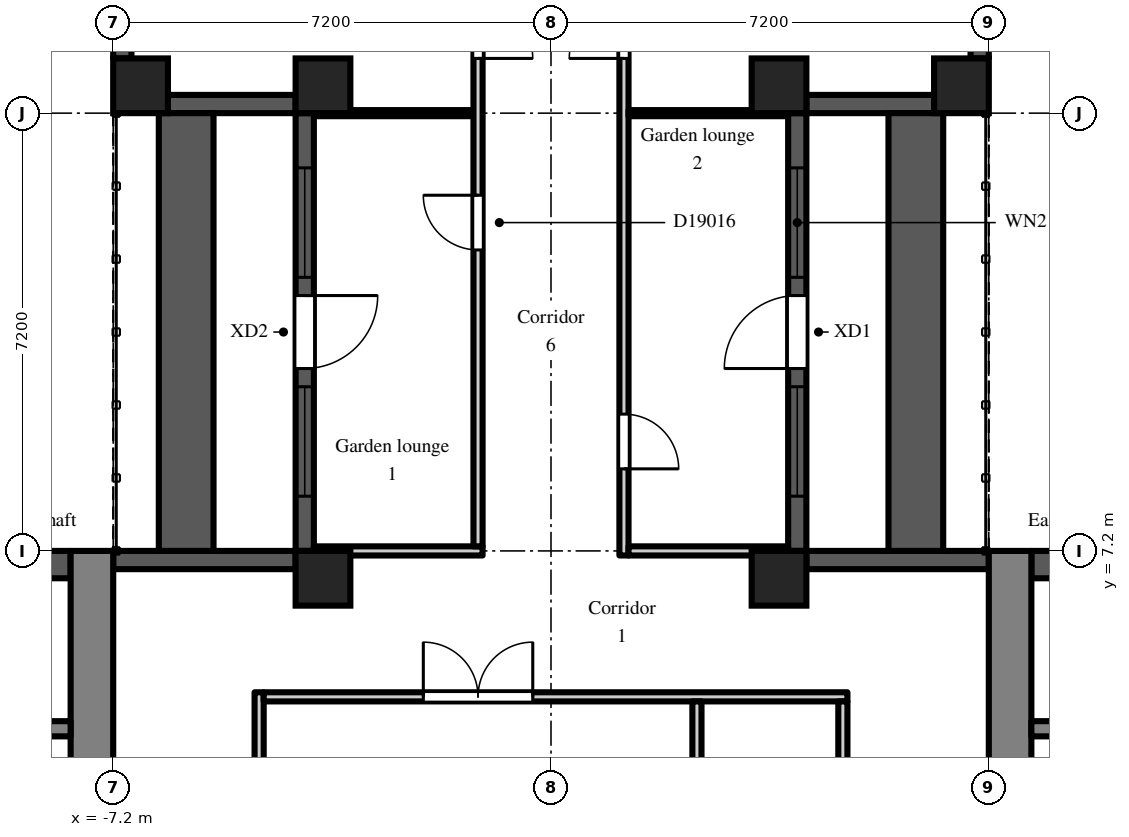
"""IFC4 building model, lengths in metres.
Left out: names, types, materials, properties, quantities, classifications, styles, units other than length and angle.
Written with IfcOpenShell. Run it as: python <this file> out.ifc"""

import sys

from ifc_helpers import new_model, si_unit, direction, frame, frame_2d, origin, origin_2d, place, context, subcontext, project, spatial, rectangle, extrude, element, fill, save


model = new_model("IFC4")
c1 = context("Model", 3, precision=1e-05, world=origin(), true_north=direction((0.0, 1.0)))
c2 = subcontext(c1, "Body", "Model", "MODEL_VIEW")
j1 = project(units=[si_unit("LENGTHUNIT", "METRE"), si_unit("PLANEANGLEUNIT", "RADIAN")], contexts=[c1])
p1 = place(None, origin())
s1 = spatial("IfcSite", under=j1, at=p1, CompositionType="ELEMENT")
p2 = place(p1, origin())
s2 = spatial("IfcBuilding", under=s1, at=p2, CompositionType="ELEMENT")
p3 = place(p2, frame((0.0, 0.0, 129.3)))
s3 = spatial("IfcBuildingStorey", under=s2, at=p3, CompositionType="ELEMENT", Elevation=129.3)
for number, where, z_axis, x_axis in (
    (1, (-6.75, 14.85, 0.0), (0.0, 0.0, 1.0), (1.0, 0.0, 0.0)),
    (2, (-3.75, 6.75, 0.0), (0.0, 0.0, 1.0), (1.0, 0.0, 0.0)),
    (3, (-3.75, 14.85, 0.0), (0.0, 0.0, 1.0), (1.0, 0.0, 0.0)),
    (4, (3.75, 6.75, 0.0), (0.0, 0.0, 1.0), (1.0, 0.0, 0.0)),
    (5, (3.75, 14.85, 0.0), (0.0, 0.0, 1.0), (1.0, 0.0, 0.0)),
    (6, (6.75, 14.85, 0.0), (0.0, 0.0, 1.0), (1.0, 0.0, 0.0)),
):
    element("IfcColumn", number, at=place(p3, frame(where, z_axis=z_axis, x_axis=x_axis)), inside=s3, PredefinedType="COLUMN", context=c2, shape_type="SweptSolid", body=[
        extrude(rectangle(XDim=0.9, YDim=0.9, at=origin_2d()), origin(), (0.0, 0.0, 1.0), 3.0),
    ])
p4 = place(p3, frame((7.2, 7.05, 0.0), z_axis=(0.0, 0.0, 1.0), x_axis=(-1.0, 0.0, 0.0)))
e7 = element("IfcWall", 7, at=p4, inside=s3, PredefinedType="SOLIDWALL", context=c2, shape_type="SweptSolid", body=[
    extrude(rectangle(XDim=3.0, YDim=0.3, at=frame_2d((1.5, 0.0))), origin(), (0.0, 0.0, 1.0), 2.2),
])
p5 = place(p3, frame((4.05, 7.2, 0.0), z_axis=(0.0, 0.0, 1.0), x_axis=(0.0, 1.0, 0.0)))
e8 = element("IfcWall", 8, at=p5, inside=s3, PredefinedType="SOLIDWALL", context=c2, shape_type="SweptSolid", body=[
    extrude(rectangle(XDim=7.2, YDim=0.3, at=frame_2d((3.6, 0.0))), origin(), (0.0, 0.0, 1.0), 2.2),
])
p6 = place(p5, frame((3.0, 0.0, 0.0)))
e9 = element("IfcOpeningElement", 9, at=p6, cuts=e8, PredefinedType="OPENING", context=c2, shape_type="SweptSolid", body=[
    extrude(rectangle(XDim=1.2, YDim=2.05, at=frame_2d((0.6, 1.025))), frame((0.0, 0.16, 0.0), z_axis=(0.0, -1.0, 0.0), x_axis=(1.0, 0.0, 0.0)), (0.0, 0.0, 1.0), 0.32),
])
p7 = place(p5, frame((0.9, 0.0, 0.2)))
e10 = element("IfcOpeningElement", 10, at=p7, cuts=e8, PredefinedType="OPENING", context=c2, shape_type="SweptSolid", body=[
    extrude(rectangle(XDim=1.8, YDim=1.85, at=frame_2d((0.9, 0.925))), frame((0.0, 0.16, 0.0), z_axis=(0.0, -1.0, 0.0), x_axis=(1.0, 0.0, 0.0)), (0.0, 0.0, 1.0), 0.32),
])
p8 = place(p5, frame((4.5, 0.0, 0.2)))
e11 = element("IfcOpeningElement", 11, at=p8, cuts=e8, PredefinedType="OPENING", context=c2, shape_type="SweptSolid", body=[
    extrude(rectangle(XDim=1.8, YDim=1.85, at=frame_2d((0.9, 0.925))), frame((0.0, 0.16, 0.0), z_axis=(0.0, -1.0, 0.0), x_axis=(1.0, 0.0, 0.0)), (0.0, 0.0, 1.0), 0.32),
])
p9 = place(p3, frame((4.2, 14.55, 0.0), z_axis=(0.0, 0.0, 1.0), x_axis=(1.0, 0.0, 0.0)))
e12 = element("IfcWall", 12, at=p9, inside=s3, PredefinedType="SOLIDWALL", context=c2, shape_type="SweptSolid", body=[
    extrude(rectangle(XDim=2.1, YDim=0.3, at=frame_2d((1.05, 0.0))), origin(), (0.0, 0.0, 1.0), 2.2),
])
p10 = place(p3, frame((7.05, 15.3, 0.0), z_axis=(0.0, 0.0, 1.0), x_axis=(0.0, 1.0, 0.0)))
e13 = element("IfcWall", 13, at=p10, inside=s3, PredefinedType="SOLIDWALL", context=c2, shape_type="SweptSolid", body=[
    extrude(rectangle(XDim=1.8, YDim=0.3, at=frame_2d((0.9, 0.0))), origin(), (0.0, 0.0, 1.0), 2.2),
])
p11 = place(p10, frame((0.3, 0.0, 0.2)))
e14 = element("IfcOpeningElement", 14, at=p11, cuts=e13, PredefinedType="OPENING", context=c2, shape_type="SweptSolid", body=[
    extrude(rectangle(XDim=1.2, YDim=1.85, at=frame_2d((0.6, 0.925))), frame((0.0, 0.16, 0.0), z_axis=(0.0, -1.0, 0.0), x_axis=(1.0, 0.0, 0.0)), (0.0, 0.0, 1.0), 0.32),
])
p12 = place(p3, frame((-7.05, 17.1, 0.0), z_axis=(0.0, 0.0, 1.0), x_axis=(0.0, -1.0, 0.0)))
e15 = element("IfcWall", 15, at=p12, inside=s3, PredefinedType="SOLIDWALL", context=c2, shape_type="SweptSolid", body=[
    extrude(rectangle(XDim=1.8, YDim=0.3, at=frame_2d((0.9, 0.0))), origin(), (0.0, 0.0, 1.0), 2.2),
])
p13 = place(p12, frame((0.3, 0.0, 0.2)))
e16 = element("IfcOpeningElement", 16, at=p13, cuts=e15, PredefinedType="OPENING", context=c2, shape_type="SweptSolid", body=[
    extrude(rectangle(XDim=1.2, YDim=1.85, at=frame_2d((0.6, 0.925))), frame((0.0, 0.16, 0.0), z_axis=(0.0, -1.0, 0.0), x_axis=(1.0, 0.0, 0.0)), (0.0, 0.0, 1.0), 0.32),
])
p14 = place(p3, frame((-6.3, 14.55, 0.0), z_axis=(0.0, 0.0, 1.0), x_axis=(1.0, 0.0, 0.0)))
e17 = element("IfcWall", 17, at=p14, inside=s3, PredefinedType="SOLIDWALL", context=c2, shape_type="SweptSolid", body=[
    extrude(rectangle(XDim=2.1, YDim=0.3, at=frame_2d((1.05, 0.0))), origin(), (0.0, 0.0, 1.0), 2.2),
])
p15 = place(p3, frame((-4.05, 14.4, 0.0), z_axis=(0.0, 0.0, 1.0), x_axis=(0.0, -1.0, 0.0)))
e18 = element("IfcWall", 18, at=p15, inside=s3, PredefinedType="SOLIDWALL", context=c2, shape_type="SweptSolid", body=[
    extrude(rectangle(XDim=7.2, YDim=0.3, at=frame_2d((3.6, 0.0))), origin(), (0.0, 0.0, 1.0), 2.2),
])
p16 = place(p15, frame((3.0, 0.0, 0.0)))
e19 = element("IfcOpeningElement", 19, at=p16, cuts=e18, PredefinedType="OPENING", context=c2, shape_type="SweptSolid", body=[
    extrude(rectangle(XDim=1.2, YDim=2.05, at=frame_2d((0.6, 1.025))), frame((0.0, 0.16, 0.0), z_axis=(0.0, -1.0, 0.0), x_axis=(1.0, 0.0, 0.0)), (0.0, 0.0, 1.0), 0.32),
])
p17 = place(p15, frame((0.9, 0.0, 0.2)))
e20 = element("IfcOpeningElement", 20, at=p17, cuts=e18, PredefinedType="OPENING", context=c2, shape_type="SweptSolid", body=[
    extrude(rectangle(XDim=1.8, YDim=1.85, at=frame_2d((0.9, 0.925))), frame((0.0, 0.16, 0.0), z_axis=(0.0, -1.0, 0.0), x_axis=(1.0, 0.0, 0.0)), (0.0, 0.0, 1.0), 0.32),
])
p18 = place(p15, frame((4.5, 0.0, 0.2)))
e21 = element("IfcOpeningElement", 21, at=p18, cuts=e18, PredefinedType="OPENING", context=c2, shape_type="SweptSolid", body=[
    extrude(rectangle(XDim=1.8, YDim=1.85, at=frame_2d((0.9, 0.925))), frame((0.0, 0.16, 0.0), z_axis=(0.0, -1.0, 0.0), x_axis=(1.0, 0.0, 0.0)), (0.0, 0.0, 1.0), 0.32),
])
p19 = place(p3, frame((-4.2, 7.05, 0.0), z_axis=(0.0, 0.0, 1.0), x_axis=(-1.0, 0.0, 0.0)))
e22 = element("IfcWall", 22, at=p19, inside=s3, PredefinedType="SOLIDWALL", context=c2, shape_type="SweptSolid", body=[
    extrude(rectangle(XDim=3.0, YDim=0.3, at=frame_2d((1.5, 0.0))), origin(), (0.0, 0.0, 1.0), 2.2),
])
for number, where, z_axis, x_axis in (
    (23, (6.0, 7.2, 0.0), (0.0, 0.0, 1.0), (0.0, 1.0, 0.0)),
    (24, (-6.0, 7.2, 0.0), (0.0, 0.0, 1.0), (0.0, 1.0, 0.0)),
):
    element("IfcWall", number, at=place(p3, frame(where, z_axis=z_axis, x_axis=x_axis)), inside=s3, PredefinedType="PARAPET", context=c2, shape_type="SweptSolid", body=[
        extrude(rectangle(XDim=7.2, YDim=0.9, at=frame_2d((3.6, 0.0))), origin(), (0.0, 0.0, 1.0), 0.8),
    ])
p20 = place(p3, frame((7.55, -7.2, 0.0), z_axis=(0.0, 0.0, 1.0), x_axis=(0.0, 1.0, 0.0)))
e25 = element("IfcWall", 25, at=p20, inside=s3, PredefinedType="SHEAR", context=c2, shape_type="SweptSolid", body=[
    extrude(rectangle(XDim=14.4, YDim=0.7, at=frame_2d((7.2, 0.0))), origin(), (0.0, 0.0, 1.0), 2.6),
])
p21 = place(p20, frame((6.0, 0.0, 0.0)))
e26 = element("IfcOpeningElement", 26, at=p21, cuts=e25, PredefinedType="OPENING", context=c2, shape_type="SweptSolid", body=[
    extrude(rectangle(XDim=2.4, YDim=2.2, at=frame_2d((1.2, 1.1))), frame((0.0, 0.36, 0.0), z_axis=(0.0, -1.0, 0.0), x_axis=(1.0, 0.0, 0.0)), (0.0, 0.0, 1.0), 0.72),
])
p22 = place(p3, frame((7.9, 6.975, 0.0), z_axis=(0.0, 0.0, 1.0), x_axis=(1.0, 0.0, 0.0)))
e27 = element("IfcWall", 27, at=p22, inside=s3, PredefinedType="SHEAR", context=c2, shape_type="SweptSolid", body=[
    extrude(rectangle(XDim=12.95, YDim=0.45, at=frame_2d((6.475, 0.0))), origin(), (0.0, 0.0, 1.0), 2.6),
])
p23 = place(p3, frame((7.9, 4.275, 0.0), z_axis=(0.0, 0.0, 1.0), x_axis=(1.0, 0.0, 0.0)))
e28 = element("IfcWall", 28, at=p23, inside=s3, PredefinedType="SHEAR", context=c2, shape_type="SweptSolid", body=[
    extrude(rectangle(XDim=1.95, YDim=0.25, at=frame_2d((0.975, 0.0))), origin(), (0.0, 0.0, 1.0), 2.6),
])
p24 = place(p3, frame((-7.55, -7.2, 0.0), z_axis=(0.0, 0.0, 1.0), x_axis=(0.0, 1.0, 0.0)))
e29 = element("IfcWall", 29, at=p24, inside=s3, PredefinedType="SHEAR", context=c2, shape_type="SweptSolid", body=[
    extrude(rectangle(XDim=14.4, YDim=0.7, at=frame_2d((7.2, 0.0))), origin(), (0.0, 0.0, 1.0), 2.6),
])
p25 = place(p24, frame((6.0, 0.0, 0.0)))
e30 = element("IfcOpeningElement", 30, at=p25, cuts=e29, PredefinedType="OPENING", context=c2, shape_type="SweptSolid", body=[
    extrude(rectangle(XDim=2.4, YDim=2.2, at=frame_2d((1.2, 1.1))), frame((0.0, 0.36, 0.0), z_axis=(0.0, -1.0, 0.0), x_axis=(1.0, 0.0, 0.0)), (0.0, 0.0, 1.0), 0.72),
])
p26 = place(p3, frame((-7.9, 6.975, 0.0), z_axis=(0.0, 0.0, 1.0), x_axis=(-1.0, 0.0, 0.0)))
e31 = element("IfcWall", 31, at=p26, inside=s3, PredefinedType="SHEAR", context=c2, shape_type="SweptSolid", body=[
    extrude(rectangle(XDim=12.95, YDim=0.45, at=frame_2d((6.475, 0.0))), origin(), (0.0, 0.0, 1.0), 2.6),
])
p27 = place(p3, frame((-7.9, 4.275, 0.0), z_axis=(0.0, 0.0, 1.0), x_axis=(-1.0, 0.0, 0.0)))
e32 = element("IfcWall", 32, at=p27, inside=s3, PredefinedType="SHEAR", context=c2, shape_type="SweptSolid", body=[
    extrude(rectangle(XDim=1.95, YDim=0.25, at=frame_2d((0.975, 0.0))), origin(), (0.0, 0.0, 1.0), 2.6),
])
p28 = place(p3, frame((-4.8, -4.875, 0.0), z_axis=(0.0, 0.0, 1.0), x_axis=(0.0, 1.0, 0.0)))
e33 = element("IfcWall", 33, at=p28, inside=s3, PredefinedType="PARTITIONING", context=c2, shape_type="SweptSolid", body=[
    extrude(rectangle(XDim=9.75, YDim=0.15, at=frame_2d((4.875, 0.0))), origin(), (0.0, 0.0, 1.0), 2.6),
])
p29 = place(p3, frame((-4.725, 4.8, 0.0), z_axis=(0.0, 0.0, 1.0), x_axis=(1.0, 0.0, 0.0)))
e34 = element("IfcWall", 34, at=p29, inside=s3, PredefinedType="PARTITIONING", context=c2, shape_type="SweptSolid", body=[
    extrude(rectangle(XDim=9.6, YDim=0.15, at=frame_2d((4.8, 0.0))), origin(), (0.0, 0.0, 1.0), 2.6),
])
p30 = place(p29, frame((2.625, 0.0, 0.0)))
e35 = element("IfcOpeningElement", 35, at=p30, cuts=e34, PredefinedType="OPENING", context=c2, shape_type="SweptSolid", body=[
    extrude(rectangle(XDim=1.8, YDim=2.1, at=frame_2d((0.9, 1.05))), frame((0.0, 0.085, 0.0), z_axis=(0.0, -1.0, 0.0), x_axis=(1.0, 0.0, 0.0)), (0.0, 0.0, 1.0), 0.17),
])
p31 = place(p3, frame((-3.9, 7.2, 0.0), z_axis=(0.0, 0.0, 1.0), x_axis=(1.0, 0.0, 0.0)))
e36 = element("IfcWall", 36, at=p31, inside=s3, PredefinedType="PARTITIONING", context=c2, shape_type="SweptSolid", body=[
    extrude(rectangle(XDim=2.775, YDim=0.15, at=frame_2d((1.387, 0.0))), origin(), (0.0, 0.0, 1.0), 2.6),
])
p32 = place(p3, frame((-3.9, 14.4, 0.0), z_axis=(0.0, 0.0, 1.0), x_axis=(1.0, 0.0, 0.0)))
e37 = element("IfcWall", 37, at=p32, inside=s3, PredefinedType="PARTITIONING", context=c2, shape_type="SweptSolid", body=[
    extrude(rectangle(XDim=2.625, YDim=0.1, at=frame_2d((1.312, 0.0))), origin(), (0.0, 0.0, 1.0), 2.6),
])
p33 = place(p3, frame((-1.2, 7.275, 0.0), z_axis=(0.0, 0.0, 1.0), x_axis=(0.0, 1.0, 0.0)))
e38 = element("IfcWall", 38, at=p33, inside=s3, PredefinedType="PARTITIONING", context=c2, shape_type="SweptSolid", body=[
    extrude(rectangle(XDim=10.65, YDim=0.15, at=frame_2d((5.325, 0.0))), origin(), (0.0, 0.0, 1.0), 2.6),
])
p34 = place(p33, frame((4.875, 0.0, 0.0)))
e39 = element("IfcOpeningElement", 39, at=p34, cuts=e38, PredefinedType="OPENING", context=c2, shape_type="SweptSolid", body=[
    extrude(rectangle(XDim=0.9, YDim=2.1, at=frame_2d((0.45, 1.05))), frame((0.0, 0.085, 0.0), z_axis=(0.0, -1.0, 0.0), x_axis=(1.0, 0.0, 0.0)), (0.0, 0.0, 1.0), 0.17),
])
p35 = place(p33, frame((8.025, 0.0, 0.0)))
e40 = element("IfcOpeningElement", 40, at=p35, cuts=e38, PredefinedType="OPENING", context=c2, shape_type="SweptSolid", body=[
    extrude(rectangle(XDim=1.8, YDim=2.1, at=frame_2d((0.9, 1.05))), frame((0.0, 0.085, 0.0), z_axis=(0.0, -1.0, 0.0), x_axis=(1.0, 0.0, 0.0)), (0.0, 0.0, 1.0), 0.17),
])
p36 = place(p3, frame((1.2, 7.125, 0.0), z_axis=(0.0, 0.0, 1.0), x_axis=(0.0, 1.0, 0.0)))
e41 = element("IfcWall", 41, at=p36, inside=s3, PredefinedType="PARTITIONING", context=c2, shape_type="SweptSolid", body=[
    extrude(rectangle(XDim=10.8, YDim=0.15, at=frame_2d((5.4, 0.0))), origin(), (0.0, 0.0, 1.0), 2.6),
])
p37 = place(p36, frame((1.425, 0.0, 0.0)))
e42 = element("IfcOpeningElement", 42, at=p37, cuts=e41, PredefinedType="OPENING", context=c2, shape_type="SweptSolid", body=[
    extrude(rectangle(XDim=0.9, YDim=2.1, at=frame_2d((0.45, 1.05))), frame((0.0, 0.085, 0.0), z_axis=(0.0, -1.0, 0.0), x_axis=(1.0, 0.0, 0.0)), (0.0, 0.0, 1.0), 0.17),
])
p38 = place(p36, frame((8.175, 0.0, 0.0)))
e43 = element("IfcOpeningElement", 43, at=p38, cuts=e41, PredefinedType="OPENING", context=c2, shape_type="SweptSolid", body=[
    extrude(rectangle(XDim=1.8, YDim=2.1, at=frame_2d((0.9, 1.05))), frame((0.0, 0.085, 0.0), z_axis=(0.0, -1.0, 0.0), x_axis=(1.0, 0.0, 0.0)), (0.0, 0.0, 1.0), 0.17),
])
p39 = place(p3, frame((1.275, 7.2, 0.0), z_axis=(0.0, 0.0, 1.0), x_axis=(1.0, 0.0, 0.0)))
e44 = element("IfcWall", 44, at=p39, inside=s3, PredefinedType="PARTITIONING", context=c2, shape_type="SweptSolid", body=[
    extrude(rectangle(XDim=2.625, YDim=0.15, at=frame_2d((1.312, 0.0))), origin(), (0.0, 0.0, 1.0), 2.6),
])
p40 = place(p3, frame((1.275, 14.4, 0.0), z_axis=(0.0, 0.0, 1.0), x_axis=(1.0, 0.0, 0.0)))
e45 = element("IfcWall", 45, at=p40, inside=s3, PredefinedType="PARTITIONING", context=c2, shape_type="SweptSolid", body=[
    extrude(rectangle(XDim=2.625, YDim=0.1, at=frame_2d((1.312, 0.0))), origin(), (0.0, 0.0, 1.0), 2.6),
])
p41 = place(p3, frame((2.4, 0.075, 0.0), z_axis=(0.0, 0.0, 1.0), x_axis=(0.0, 1.0, 0.0)))
e46 = element("IfcWall", 46, at=p41, inside=s3, PredefinedType="PARTITIONING", context=c2, shape_type="SweptSolid", body=[
    extrude(rectangle(XDim=4.65, YDim=0.15, at=frame_2d((2.325, 0.0))), origin(), (0.0, 0.0, 1.0), 2.6),
])
p42 = place(p3, frame((4.8, -4.725, 0.0), z_axis=(0.0, 0.0, 1.0), x_axis=(0.0, 1.0, 0.0)))
e47 = element("IfcWall", 47, at=p42, inside=s3, PredefinedType="PARTITIONING", context=c2, shape_type="SweptSolid", body=[
    extrude(rectangle(XDim=9.45, YDim=0.15, at=frame_2d((4.725, 0.0))), origin(), (0.0, 0.0, 1.0), 2.6),
])
p43 = place(p42, frame((3.075, 0.0, 0.0)))
e48 = element("IfcOpeningElement", 48, at=p43, cuts=e47, PredefinedType="OPENING", context=c2, shape_type="SweptSolid", body=[
    extrude(rectangle(XDim=0.9, YDim=2.1, at=frame_2d((0.45, 1.05))), frame((0.0, 0.085, 0.0), z_axis=(0.0, -1.0, 0.0), x_axis=(1.0, 0.0, 0.0)), (0.0, 0.0, 1.0), 0.17),
])
p44 = place(p42, frame((6.675, 0.0, 0.0)))
e49 = element("IfcOpeningElement", 49, at=p44, cuts=e47, PredefinedType="OPENING", context=c2, shape_type="SweptSolid", body=[
    extrude(rectangle(XDim=0.9, YDim=2.1, at=frame_2d((0.45, 1.05))), frame((0.0, 0.085, 0.0), z_axis=(0.0, -1.0, 0.0), x_axis=(1.0, 0.0, 0.0)), (0.0, 0.0, 1.0), 0.17),
])
p45 = place(p6, origin())
e50 = element("IfcDoor", 50, at=p45, inside=s3, OperationType="SINGLE_SWING_LEFT", PredefinedType="DOOR", context=c2, shape_type="SweptSolid", body=[
    extrude(rectangle(XDim=1.2, YDim=2.05, at=frame_2d((0.6, 1.025))), frame((0.0, 0.025, 0.0), z_axis=(0.0, -1.0, 0.0), x_axis=(1.0, 0.0, 0.0)), (0.0, 0.0, 1.0), 0.05),
])
fill(e9, e50)
p46 = place(p7, origin())
e51 = element("IfcWindow", 51, at=p46, inside=s3, PartitioningType="SINGLE_PANEL", PredefinedType="WINDOW", context=c2, shape_type="SweptSolid", body=[
    extrude(rectangle(XDim=1.8, YDim=1.85, at=frame_2d((0.9, 0.925))), frame((0.0, 0.03, 0.0), z_axis=(0.0, -1.0, 0.0), x_axis=(1.0, 0.0, 0.0)), (0.0, 0.0, 1.0), 0.06),
])
fill(e10, e51)
p47 = place(p8, origin())
e52 = element("IfcWindow", 52, at=p47, inside=s3, PartitioningType="SINGLE_PANEL", PredefinedType="WINDOW", context=c2, shape_type="SweptSolid", body=[
    extrude(rectangle(XDim=1.8, YDim=1.85, at=frame_2d((0.9, 0.925))), frame((0.0, 0.03, 0.0), z_axis=(0.0, -1.0, 0.0), x_axis=(1.0, 0.0, 0.0)), (0.0, 0.0, 1.0), 0.06),
])
fill(e11, e52)
p48 = place(p16, origin())
e53 = element("IfcDoor", 53, at=p48, inside=s3, OperationType="SINGLE_SWING_LEFT", PredefinedType="DOOR", context=c2, shape_type="SweptSolid", body=[
    extrude(rectangle(XDim=1.2, YDim=2.05, at=frame_2d((0.6, 1.025))), frame((0.0, 0.025, 0.0), z_axis=(0.0, -1.0, 0.0), x_axis=(1.0, 0.0, 0.0)), (0.0, 0.0, 1.0), 0.05),
])
fill(e19, e53)
p49 = place(p17, origin())
e54 = element("IfcWindow", 54, at=p49, inside=s3, PartitioningType="SINGLE_PANEL", PredefinedType="WINDOW", context=c2, shape_type="SweptSolid", body=[
    extrude(rectangle(XDim=1.8, YDim=1.85, at=frame_2d((0.9, 0.925))), frame((0.0, 0.03, 0.0), z_axis=(0.0, -1.0, 0.0), x_axis=(1.0, 0.0, 0.0)), (0.0, 0.0, 1.0), 0.06),
])
fill(e20, e54)
p50 = place(p18, origin())
e55 = element("IfcWindow", 55, at=p50, inside=s3, PartitioningType="SINGLE_PANEL", PredefinedType="WINDOW", context=c2, shape_type="SweptSolid", body=[
    extrude(rectangle(XDim=1.8, YDim=1.85, at=frame_2d((0.9, 0.925))), frame((0.0, 0.03, 0.0), z_axis=(0.0, -1.0, 0.0), x_axis=(1.0, 0.0, 0.0)), (0.0, 0.0, 1.0), 0.06),
])
fill(e21, e55)
p51 = place(p30, origin())
e56 = element("IfcDoor", 56, at=p51, inside=s3, OperationType="DOUBLE_DOOR_DOUBLE_SWING", PredefinedType="DOOR", context=c2, shape_type="SweptSolid", body=[
    extrude(rectangle(XDim=1.8, YDim=2.1, at=frame_2d((0.9, 1.05))), frame((0.0, 0.025, 0.0), z_axis=(0.0, -1.0, 0.0), x_axis=(1.0, 0.0, 0.0)), (0.0, 0.0, 1.0), 0.05),
])
fill(e35, e56)
p52 = place(p34, origin())
e57 = element("IfcDoor", 57, at=p52, inside=s3, OperationType="SINGLE_SWING_RIGHT", PredefinedType="DOOR", context=c2, shape_type="SweptSolid", body=[
    extrude(rectangle(XDim=0.9, YDim=2.1, at=frame_2d((0.45, 1.05))), frame((0.0, 0.025, 0.0), z_axis=(0.0, -1.0, 0.0), x_axis=(1.0, 0.0, 0.0)), (0.0, 0.0, 1.0), 0.05),
])
fill(e39, e57)
p53 = place(p35, frame((1.8, 0.0, 0.0), z_axis=(0.0, 0.0, 1.0), x_axis=(-1.0, 0.0, 0.0)))
e58 = element("IfcDoor", 58, at=p53, inside=s3, OperationType="DOUBLE_DOOR_DOUBLE_SWING", PredefinedType="DOOR", context=c2, shape_type="SweptSolid", body=[
    extrude(rectangle(XDim=1.8, YDim=2.1, at=frame_2d((0.9, 1.05))), frame((0.0, 0.025, 0.0), z_axis=(0.0, -1.0, 0.0), x_axis=(1.0, 0.0, 0.0)), (0.0, 0.0, 1.0), 0.05),
])
fill(e40, e58)
p54 = place(p37, frame((0.9, 0.0, 0.0), z_axis=(0.0, 0.0, 1.0), x_axis=(-1.0, 0.0, 0.0)))
e59 = element("IfcDoor", 59, at=p54, inside=s3, OperationType="SINGLE_SWING_RIGHT", PredefinedType="DOOR", context=c2, shape_type="SweptSolid", body=[
    extrude(rectangle(XDim=0.9, YDim=2.1, at=frame_2d((0.45, 1.05))), frame((0.0, 0.025, 0.0), z_axis=(0.0, -1.0, 0.0), x_axis=(1.0, 0.0, 0.0)), (0.0, 0.0, 1.0), 0.05),
])
fill(e42, e59)
p55 = place(p38, origin())
e60 = element("IfcDoor", 60, at=p55, inside=s3, OperationType="DOUBLE_DOOR_DOUBLE_SWING", PredefinedType="DOOR", context=c2, shape_type="SweptSolid", body=[
    extrude(rectangle(XDim=1.8, YDim=2.1, at=frame_2d((0.9, 1.05))), frame((0.0, 0.025, 0.0), z_axis=(0.0, -1.0, 0.0), x_axis=(1.0, 0.0, 0.0)), (0.0, 0.0, 1.0), 0.05),
])
fill(e43, e60)
save(model, sys.argv[1])
